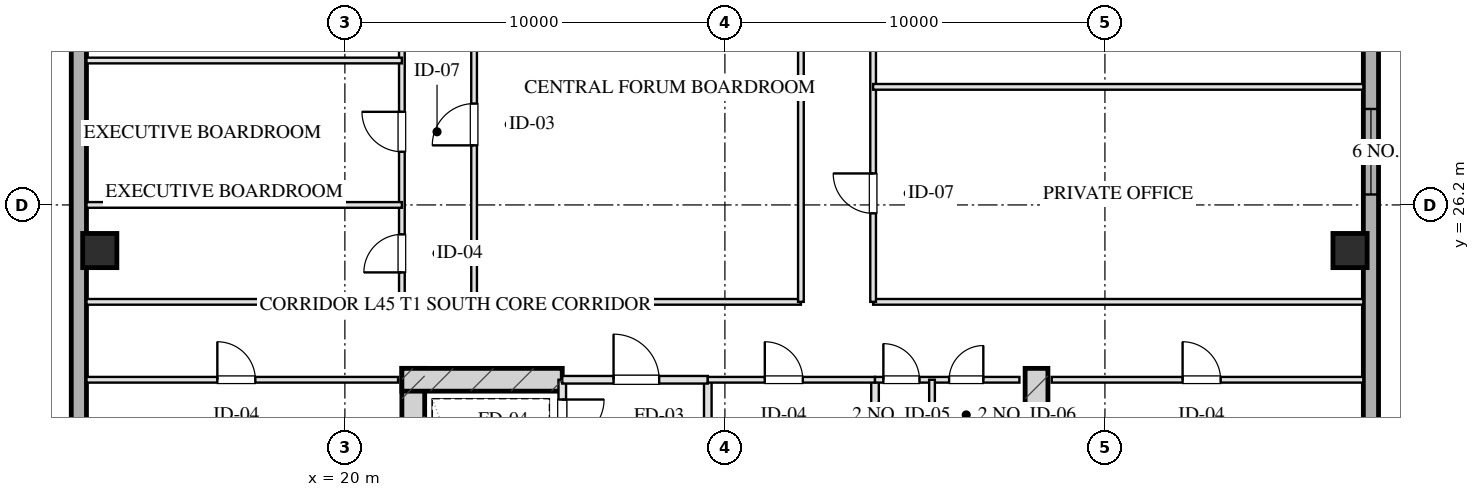
"""IFC4 building model, lengths in metres.
Left out: names, types, materials, properties, quantities, classifications, styles, units other than length and angle.
Written with IfcOpenShell. Run it as: python <this file> out.ifc"""

import sys

from ifc_helpers import new_model, si_unit, direction, frame, frame_2d, origin, origin_2d, place, context, subcontext, project, spatial, rectangle, hollow_rectangle, extrude, element, fill, save


model = new_model("IFC4")
c1 = context("Model", 3, precision=1e-05, world=origin(), true_north=direction((0.0, 1.0)))
c2 = subcontext(c1, "Body", "Model", "MODEL_VIEW")
j1 = project(units=[si_unit("LENGTHUNIT", "METRE"), si_unit("PLANEANGLEUNIT", "RADIAN")], contexts=[c1])
p1 = place(None, origin())
s1 = spatial("IfcSite", under=j1, at=p1, CompositionType="ELEMENT")
p2 = place(p1, origin())
s2 = spatial("IfcBuilding", under=s1, at=p2, CompositionType="ELEMENT")
p3 = place(p2, frame((0.0, 0.0, 170.2)))
s3 = spatial("IfcBuildingStorey", under=s2, at=p3, CompositionType="ELEMENT", Elevation=170.2)
for number, where, z_axis, x_axis in (
    (1, (21.8, 21.9, 0.0), (0.0, 0.0, 1.0), (0.0, -1.0, 0.0)),
    (2, (38.2, 21.9, 0.0), (0.0, 0.0, 1.0), (0.0, -1.0, 0.0)),
):
    element("IfcWall", number, at=place(p3, frame(where, z_axis=z_axis, x_axis=x_axis)), inside=s3, PredefinedType="SHEAR", context=c2, shape_type="SweptSolid", body=[
        extrude(rectangle(XDim=9.48, YDim=0.6, at=frame_2d((4.74, 0.0))), origin(), (0.0, 0.0, 1.0), 3.45),
    ])
p4 = place(p3, frame((21.5, 21.6, 0.0), z_axis=(0.0, 0.0, 1.0), x_axis=(1.0, 0.0, 0.0)))
e3 = element("IfcWall", 3, at=p4, inside=s3, PredefinedType="SHEAR", context=c2, shape_type="SweptSolid", body=[
    extrude(rectangle(XDim=4.22, YDim=0.6, at=frame_2d((2.11, 0.0))), origin(), (0.0, 0.0, 1.0), 3.45),
])
for number, where, z_axis, x_axis in (
    (4, (13.55, 25.0, 0.0), (0.0, 0.0, 1.0), (1.0, 0.0, 0.0)),
    (5, (46.45, 25.0, 0.0), (0.0, 0.0, 1.0), (1.0, 0.0, 0.0)),
):
    element("IfcColumn", number, at=place(p3, frame(where, z_axis=z_axis, x_axis=x_axis)), inside=s3, PredefinedType="COLUMN", context=c2, shape_type="SweptSolid", body=[
        extrude(hollow_rectangle(XDim=0.9, YDim=0.9, WallThickness=0.032, at=origin_2d()), origin(), (0.0, 0.0, 1.0), 3.451),
    ])
p5 = place(p3, frame((13.0, 10.8, 0.0), z_axis=(0.0, 0.0, 1.0), x_axis=(0.0, 1.0, 0.0)))
e6 = element("IfcWall", 6, at=p5, inside=s3, PredefinedType="SOLIDWALL", context=c2, shape_type="SweptSolid", body=[
    extrude(rectangle(XDim=46.4, YDim=0.4, at=frame_2d((23.2, 0.0))), origin(), (0.0, 0.0, 1.0), 2.61),
])
p6 = place(p3, frame((47.0, 57.2, 0.0), z_axis=(0.0, 0.0, 1.0), x_axis=(0.0, -1.0, 0.0)))
e7 = element("IfcWall", 7, at=p6, inside=s3, PredefinedType="SOLIDWALL", context=c2, shape_type="SweptSolid", body=[
    extrude(rectangle(XDim=46.4, YDim=0.4, at=frame_2d((23.2, 0.0))), origin(), (0.0, 0.0, 1.0), 2.61),
])
p7 = place(p6, frame((28.475, 0.0, 0.75)))
e8 = element("IfcOpeningElement", 8, at=p7, cuts=e7, PredefinedType="OPENING", context=c2, shape_type="SweptSolid", body=[
    extrude(rectangle(XDim=2.25, YDim=1.46, at=frame_2d((1.125, 0.73))), frame((0.0, 0.21, 0.0), z_axis=(0.0, -1.0, 0.0), x_axis=(1.0, 0.0, 0.0)), (0.0, 0.0, 1.0), 0.42),
])
p8 = place(p6, frame((24.675, 0.0, 0.75)))
e9 = element("IfcOpeningElement", 9, at=p8, cuts=e7, PredefinedType="OPENING", context=c2, shape_type="SweptSolid", body=[
    extrude(rectangle(XDim=2.25, YDim=1.46, at=frame_2d((1.125, 0.73))), frame((0.0, 0.21, 0.0), z_axis=(0.0, -1.0, 0.0), x_axis=(1.0, 0.0, 0.0)), (0.0, 0.0, 1.0), 0.42),
])
p9 = place(p3, frame((25.72, 21.6, 0.0), z_axis=(0.0, 0.0, 1.0), x_axis=(0.0, -1.0, 0.0)))
e10 = element("IfcWall", 10, at=p9, inside=s3, PredefinedType="PARTITIONING", context=c2, shape_type="SweptSolid", body=[
    extrude(rectangle(XDim=1.9, YDim=0.2, at=frame_2d((0.95, 0.0))), origin(), (0.0, 0.0, 1.0), 3.175),
])
p10 = place(p9, frame((0.52, 0.0, 0.0)))
e11 = element("IfcOpeningElement", 11, at=p10, cuts=e10, PredefinedType="OPENING", context=c2, shape_type="SweptSolid", body=[
    extrude(rectangle(XDim=1.1, YDim=2.05, at=frame_2d((0.55, 1.025))), frame((0.0, 0.11, 0.0), z_axis=(0.0, -1.0, 0.0), x_axis=(1.0, 0.0, 0.0)), (0.0, 0.0, 1.0), 0.22),
])
p11 = place(p3, frame((29.55, 21.6, 0.0), z_axis=(0.0, 0.0, 1.0), x_axis=(0.0, -1.0, 0.0)))
e12 = element("IfcWall", 12, at=p11, inside=s3, PredefinedType="PARTITIONING", context=c2, shape_type="SweptSolid", body=[
    extrude(rectangle(XDim=8.43, YDim=0.2, at=frame_2d((4.215, 0.0))), origin(), (0.0, 0.0, 1.0), 3.175),
])
p12 = place(p3, frame((25.72, 21.6, 0.0), z_axis=(0.0, 0.0, 1.0), x_axis=(1.0, 0.0, 0.0)))
e13 = element("IfcWall", 13, at=p12, inside=s3, PredefinedType="PARTITIONING", context=c2, shape_type="SweptSolid", body=[
    extrude(rectangle(XDim=3.83, YDim=0.2, at=frame_2d((1.915, 0.0))), origin(), (0.0, 0.0, 1.0), 3.175),
])
p13 = place(p12, frame((1.35, 0.0, 0.0)))
e14 = element("IfcOpeningElement", 14, at=p13, cuts=e13, PredefinedType="OPENING", context=c2, shape_type="SweptSolid", body=[
    extrude(rectangle(XDim=1.2, YDim=2.05, at=frame_2d((0.6, 1.025))), frame((0.0, 0.11, 0.0), z_axis=(0.0, -1.0, 0.0), x_axis=(1.0, 0.0, 0.0)), (0.0, 0.0, 1.0), 0.22),
])
p14 = place(p3, frame((33.95, 21.6, 0.0), z_axis=(0.0, 0.0, 1.0), x_axis=(0.0, -1.0, 0.0)))
e15 = element("IfcWall", 15, at=p14, inside=s3, PredefinedType="PARTITIONING", context=c2, shape_type="SweptSolid", body=[
    extrude(rectangle(XDim=8.43, YDim=0.2, at=frame_2d((4.215, 0.0))), origin(), (0.0, 0.0, 1.0), 3.175),
])
p15 = place(p3, frame((29.55, 21.6, 0.0), z_axis=(0.0, 0.0, 1.0), x_axis=(1.0, 0.0, 0.0)))
e16 = element("IfcWall", 16, at=p15, inside=s3, PredefinedType="PARTITIONING", context=c2, shape_type="SweptSolid", body=[
    extrude(rectangle(XDim=4.4, YDim=0.15, at=frame_2d((2.2, 0.0))), origin(), (0.0, 0.0, 1.0), 3.175),
])
p16 = place(p15, frame((1.5, 0.0, 0.0)))
e17 = element("IfcOpeningElement", 17, at=p16, cuts=e16, PredefinedType="OPENING", context=c2, shape_type="SweptSolid", body=[
    extrude(rectangle(XDim=1.0, YDim=2.05, at=frame_2d((0.5, 1.025))), frame((0.0, 0.085, 0.0), z_axis=(0.0, -1.0, 0.0), x_axis=(1.0, 0.0, 0.0)), (0.0, 0.0, 1.0), 0.17),
])
p17 = place(p3, frame((33.95, 21.6, 0.0), z_axis=(0.0, 0.0, 1.0), x_axis=(1.0, 0.0, 0.0)))
e18 = element("IfcWall", 18, at=p17, inside=s3, PredefinedType="PARTITIONING", context=c2, shape_type="SweptSolid", body=[
    extrude(rectangle(XDim=3.8, YDim=0.15, at=frame_2d((1.9, 0.0))), origin(), (0.0, 0.0, 1.0), 3.175),
])
p18 = place(p17, frame((0.22, 0.0, 0.0)))
e19 = element("IfcOpeningElement", 19, at=p18, cuts=e18, PredefinedType="OPENING", context=c2, shape_type="SweptSolid", body=[
    extrude(rectangle(XDim=0.95, YDim=2.05, at=frame_2d((0.475, 1.025))), frame((0.0, 0.085, 0.0), z_axis=(0.0, -1.0, 0.0), x_axis=(1.0, 0.0, 0.0)), (0.0, 0.0, 1.0), 0.17),
])
p19 = place(p17, frame((1.95, 0.0, 0.0)))
e20 = element("IfcOpeningElement", 20, at=p19, cuts=e18, PredefinedType="OPENING", context=c2, shape_type="SweptSolid", body=[
    extrude(rectangle(XDim=0.9, YDim=2.05, at=frame_2d((0.45, 1.025))), frame((0.0, 0.085, 0.0), z_axis=(0.0, -1.0, 0.0), x_axis=(1.0, 0.0, 0.0)), (0.0, 0.0, 1.0), 0.17),
])
p20 = place(p3, frame((35.45, 21.6, 0.0), z_axis=(0.0, 0.0, 1.0), x_axis=(0.0, -1.0, 0.0)))
e21 = element("IfcWall", 21, at=p20, inside=s3, PredefinedType="PARTITIONING", context=c2, shape_type="SweptSolid", body=[
    extrude(rectangle(XDim=8.43, YDim=0.15, at=frame_2d((4.215, 0.0))), origin(), (0.0, 0.0, 1.0), 2.815),
])
p21 = place(p20, frame((2.55, 0.0, 0.0)))
e22 = element("IfcOpeningElement", 22, at=p21, cuts=e21, PredefinedType="OPENING", context=c2, shape_type="SweptSolid", body=[
    extrude(rectangle(XDim=0.95, YDim=2.05, at=frame_2d((0.475, 1.025))), frame((0.0, 0.085, 0.0), z_axis=(0.0, -1.0, 0.0), x_axis=(1.0, 0.0, 0.0)), (0.0, 0.0, 1.0), 0.17),
])
p22 = place(p20, frame((5.6, 0.0, 0.0)))
e23 = element("IfcOpeningElement", 23, at=p22, cuts=e21, PredefinedType="OPENING", context=c2, shape_type="SweptSolid", body=[
    extrude(rectangle(XDim=0.9, YDim=2.05, at=frame_2d((0.45, 1.025))), frame((0.0, 0.085, 0.0), z_axis=(0.0, -1.0, 0.0), x_axis=(1.0, 0.0, 0.0)), (0.0, 0.0, 1.0), 0.17),
])
p23 = place(p3, frame((13.2, 21.6, 0.0), z_axis=(0.0, 0.0, 1.0), x_axis=(1.0, 0.0, 0.0)))
e24 = element("IfcWall", 24, at=p23, inside=s3, PredefinedType="PARTITIONING", context=c2, shape_type="SweptSolid", body=[
    extrude(rectangle(XDim=8.2, YDim=0.15, at=frame_2d((4.1, 0.0))), origin(), (0.0, 0.0, 1.0), 3.175),
])
p24 = place(p23, frame((3.444, 0.0, 0.0)))
e25 = element("IfcOpeningElement", 25, at=p24, cuts=e24, PredefinedType="OPENING", context=c2, shape_type="SweptSolid", body=[
    extrude(rectangle(XDim=1.0, YDim=2.05, at=frame_2d((0.5, 1.025))), frame((0.0, 0.085, 0.0), z_axis=(0.0, -1.0, 0.0), x_axis=(1.0, 0.0, 0.0)), (0.0, 0.0, 1.0), 0.17),
])
p25 = place(p3, frame((38.6, 21.6, 0.0), z_axis=(0.0, 0.0, 1.0), x_axis=(1.0, 0.0, 0.0)))
e26 = element("IfcWall", 26, at=p25, inside=s3, PredefinedType="PARTITIONING", context=c2, shape_type="SweptSolid", body=[
    extrude(rectangle(XDim=8.2, YDim=0.15, at=frame_2d((4.1, 0.0))), origin(), (0.0, 0.0, 1.0), 3.175),
])
p26 = place(p25, frame((3.444, 0.0, 0.0)))
e27 = element("IfcOpeningElement", 27, at=p26, cuts=e26, PredefinedType="OPENING", context=c2, shape_type="SweptSolid", body=[
    extrude(rectangle(XDim=1.0, YDim=2.05, at=frame_2d((0.5, 1.025))), frame((0.0, 0.085, 0.0), z_axis=(0.0, -1.0, 0.0), x_axis=(1.0, 0.0, 0.0)), (0.0, 0.0, 1.0), 0.17),
])
p27 = place(p3, frame((13.2, 23.65, 0.0), z_axis=(0.0, 0.0, 1.0), x_axis=(1.0, 0.0, 0.0)))
e28 = element("IfcWall", 28, at=p27, inside=s3, PredefinedType="PARTITIONING", context=c2, shape_type="SweptSolid", body=[
    extrude(rectangle(XDim=8.3, YDim=0.15, at=frame_2d((4.15, 0.0))), origin(), (0.0, 0.0, 1.0), 3.175),
])
p28 = place(p3, frame((23.4, 23.65, 0.0), z_axis=(0.0, 0.0, 1.0), x_axis=(1.0, 0.0, 0.0)))
e29 = element("IfcWall", 29, at=p28, inside=s3, PredefinedType="PARTITIONING", context=c2, shape_type="SweptSolid", body=[
    extrude(rectangle(XDim=8.6, YDim=0.15, at=frame_2d((4.3, 0.0))), origin(), (0.0, 0.0, 1.0), 3.175),
])
p29 = place(p3, frame((33.9, 23.65, 0.0), z_axis=(0.0, 0.0, 1.0), x_axis=(1.0, 0.0, 0.0)))
e30 = element("IfcWall", 30, at=p29, inside=s3, PredefinedType="PARTITIONING", context=c2, shape_type="SweptSolid", body=[
    extrude(rectangle(XDim=12.9, YDim=0.15, at=frame_2d((6.45, 0.0))), origin(), (0.0, 0.0, 1.0), 3.175),
])
p30 = place(p3, frame((21.5, 23.65, 0.0), z_axis=(0.0, 0.0, 1.0), x_axis=(0.0, 1.0, 0.0)))
e31 = element("IfcWall", 31, at=p30, inside=s3, PredefinedType="PARTITIONING", context=c2, shape_type="SweptSolid", body=[
    extrude(rectangle(XDim=20.7, YDim=0.15, at=frame_2d((10.35, 0.0))), origin(), (0.0, 0.0, 1.0), 3.175),
])
p31 = place(p30, frame((0.775, 0.0, 0.0)))
e32 = element("IfcOpeningElement", 32, at=p31, cuts=e31, PredefinedType="OPENING", context=c2, shape_type="SweptSolid", body=[
    extrude(rectangle(XDim=1.0, YDim=2.05, at=frame_2d((0.5, 1.025))), frame((0.0, 0.085, 0.0), z_axis=(0.0, -1.0, 0.0), x_axis=(1.0, 0.0, 0.0)), (0.0, 0.0, 1.0), 0.17),
])
p32 = place(p30, frame((3.95, 0.0, 0.0)))
e33 = element("IfcOpeningElement", 33, at=p32, cuts=e31, PredefinedType="OPENING", context=c2, shape_type="SweptSolid", body=[
    extrude(rectangle(XDim=1.05, YDim=2.05, at=frame_2d((0.525, 1.025))), frame((0.0, 0.085, 0.0), z_axis=(0.0, -1.0, 0.0), x_axis=(1.0, 0.0, 0.0)), (0.0, 0.0, 1.0), 0.17),
])
p33 = place(p30, frame((7.51, 0.0, 0.0)))
e34 = element("IfcOpeningElement", 34, at=p33, cuts=e31, PredefinedType="OPENING", context=c2, shape_type="SweptSolid", body=[
    extrude(rectangle(XDim=1.0, YDim=2.05, at=frame_2d((0.5, 1.025))), frame((0.0, 0.085, 0.0), z_axis=(0.0, -1.0, 0.0), x_axis=(1.0, 0.0, 0.0)), (0.0, 0.0, 1.0), 0.17),
])
p34 = place(p30, frame((11.51, 0.0, 0.0)))
e35 = element("IfcOpeningElement", 35, at=p34, cuts=e31, PredefinedType="OPENING", context=c2, shape_type="SweptSolid", body=[
    extrude(rectangle(XDim=1.0, YDim=2.05, at=frame_2d((0.5, 1.025))), frame((0.0, 0.085, 0.0), z_axis=(0.0, -1.0, 0.0), x_axis=(1.0, 0.0, 0.0)), (0.0, 0.0, 1.0), 0.17),
])
p35 = place(p30, frame((15.75, 0.0, 0.0)))
e36 = element("IfcOpeningElement", 36, at=p35, cuts=e31, PredefinedType="OPENING", context=c2, shape_type="SweptSolid", body=[
    extrude(rectangle(XDim=1.0, YDim=2.05, at=frame_2d((0.5, 1.025))), frame((0.0, 0.085, 0.0), z_axis=(0.0, -1.0, 0.0), x_axis=(1.0, 0.0, 0.0)), (0.0, 0.0, 1.0), 0.17),
])
p36 = place(p30, frame((18.925, 0.0, 0.0)))
e37 = element("IfcOpeningElement", 37, at=p36, cuts=e31, PredefinedType="OPENING", context=c2, shape_type="SweptSolid", body=[
    extrude(rectangle(XDim=0.85, YDim=2.05, at=frame_2d((0.425, 1.025))), frame((0.0, 0.085, 0.0), z_axis=(0.0, -1.0, 0.0), x_axis=(1.0, 0.0, 0.0)), (0.0, 0.0, 1.0), 0.17),
])
p37 = place(p3, frame((23.4, 23.65, 0.0), z_axis=(0.0, 0.0, 1.0), x_axis=(0.0, 1.0, 0.0)))
e38 = element("IfcWall", 38, at=p37, inside=s3, PredefinedType="PARTITIONING", context=c2, shape_type="SweptSolid", body=[
    extrude(rectangle(XDim=20.7, YDim=0.15, at=frame_2d((10.35, 0.0))), origin(), (0.0, 0.0, 1.0), 3.175),
])
p38 = place(p37, frame((4.117, 0.0, 0.0)))
e39 = element("IfcOpeningElement", 39, at=p38, cuts=e38, PredefinedType="OPENING", context=c2, shape_type="SweptSolid", body=[
    extrude(rectangle(XDim=1.1, YDim=2.05, at=frame_2d((0.55, 1.025))), frame((0.0, 0.085, 0.0), z_axis=(0.0, -1.0, 0.0), x_axis=(1.0, 0.0, 0.0)), (0.0, 0.0, 1.0), 0.17),
])
p39 = place(p37, frame((14.347, 0.0, 0.0)))
e40 = element("IfcOpeningElement", 40, at=p39, cuts=e38, PredefinedType="OPENING", context=c2, shape_type="SweptSolid", body=[
    extrude(rectangle(XDim=1.1, YDim=2.05, at=frame_2d((0.55, 1.025))), frame((0.0, 0.085, 0.0), z_axis=(0.0, -1.0, 0.0), x_axis=(1.0, 0.0, 0.0)), (0.0, 0.0, 1.0), 0.17),
])
p40 = place(p3, frame((32.0, 23.65, 0.0), z_axis=(0.0, 0.0, 1.0), x_axis=(0.0, 1.0, 0.0)))
e41 = element("IfcWall", 41, at=p40, inside=s3, PredefinedType="PARTITIONING", context=c2, shape_type="SweptSolid", body=[
    extrude(rectangle(XDim=20.7, YDim=0.15, at=frame_2d((10.35, 0.0))), origin(), (0.0, 0.0, 1.0), 3.175),
])
p41 = place(p3, frame((33.9, 23.65, 0.0), z_axis=(0.0, 0.0, 1.0), x_axis=(0.0, 1.0, 0.0)))
e42 = element("IfcWall", 42, at=p41, inside=s3, PredefinedType="PARTITIONING", context=c2, shape_type="SweptSolid", body=[
    extrude(rectangle(XDim=20.7, YDim=0.15, at=frame_2d((10.35, 0.0))), origin(), (0.0, 0.0, 1.0), 3.175),
])
p42 = place(p41, frame((2.329, 0.0, 0.0)))
e43 = element("IfcOpeningElement", 43, at=p42, cuts=e42, PredefinedType="OPENING", context=c2, shape_type="SweptSolid", body=[
    extrude(rectangle(XDim=1.05, YDim=2.05, at=frame_2d((0.525, 1.025))), frame((0.0, 0.085, 0.0), z_axis=(0.0, -1.0, 0.0), x_axis=(1.0, 0.0, 0.0)), (0.0, 0.0, 1.0), 0.17),
])
p43 = place(p41, frame((8.104, 0.0, 0.0)))
e44 = element("IfcOpeningElement", 44, at=p43, cuts=e42, PredefinedType="OPENING", context=c2, shape_type="SweptSolid", body=[
    extrude(rectangle(XDim=1.0, YDim=2.05, at=frame_2d((0.5, 1.025))), frame((0.0, 0.085, 0.0), z_axis=(0.0, -1.0, 0.0), x_axis=(1.0, 0.0, 0.0)), (0.0, 0.0, 1.0), 0.17),
])
p44 = place(p41, frame((14.35, 0.0, 0.0)))
e45 = element("IfcOpeningElement", 45, at=p44, cuts=e42, PredefinedType="OPENING", context=c2, shape_type="SweptSolid", body=[
    extrude(rectangle(XDim=1.0, YDim=2.05, at=frame_2d((0.5, 1.025))), frame((0.0, 0.085, 0.0), z_axis=(0.0, -1.0, 0.0), x_axis=(1.0, 0.0, 0.0)), (0.0, 0.0, 1.0), 0.17),
])
p45 = place(p41, frame((18.925, 0.0, 0.0)))
e46 = element("IfcOpeningElement", 46, at=p45, cuts=e42, PredefinedType="OPENING", context=c2, shape_type="SweptSolid", body=[
    extrude(rectangle(XDim=1.0, YDim=2.05, at=frame_2d((0.5, 1.025))), frame((0.0, 0.085, 0.0), z_axis=(0.0, -1.0, 0.0), x_axis=(1.0, 0.0, 0.0)), (0.0, 0.0, 1.0), 0.17),
])
for number, where, z_axis, x_axis in (
    (47, (13.2, 26.2, 0.0), (0.0, 0.0, 1.0), (1.0, 0.0, 0.0)),
    (48, (13.2, 30.0, 0.0), (0.0, 0.0, 1.0), (1.0, 0.0, 0.0)),
):
    element("IfcWall", number, at=place(p3, frame(where, z_axis=z_axis, x_axis=x_axis)), inside=s3, PredefinedType="PARTITIONING", context=c2, shape_type="SweptSolid", body=[
        extrude(rectangle(XDim=8.3, YDim=0.15, at=frame_2d((4.15, 0.0))), origin(), (0.0, 0.0, 1.0), 3.175),
    ])
p46 = place(p3, frame((33.9, 29.307, 0.0), z_axis=(0.0, 0.0, 1.0), x_axis=(1.0, 0.0, 0.0)))
e49 = element("IfcWall", 49, at=p46, inside=s3, PredefinedType="PARTITIONING", context=c2, shape_type="SweptSolid", body=[
    extrude(rectangle(XDim=12.9, YDim=0.15, at=frame_2d((6.45, 0.0))), origin(), (0.0, 0.0, 1.0), 3.175),
])
p47 = place(p7, origin())
e50 = element("IfcWindow", 50, at=p47, inside=s3, PartitioningType="TRIPLE_PANEL_VERTICAL", PredefinedType="WINDOW", context=c2, shape_type="SweptSolid", body=[
    extrude(rectangle(XDim=2.25, YDim=1.46, at=frame_2d((1.125, 0.73))), frame((0.0, 0.03, 0.0), z_axis=(0.0, -1.0, 0.0), x_axis=(1.0, 0.0, 0.0)), (0.0, 0.0, 1.0), 0.06),
])
fill(e8, e50)
p48 = place(p10, origin())
e51 = element("IfcDoor", 51, at=p48, inside=s3, OperationType="SINGLE_SWING_LEFT", PredefinedType="DOOR", context=c2, shape_type="SweptSolid", body=[
    extrude(rectangle(XDim=1.1, YDim=2.05, at=frame_2d((0.55, 1.025))), frame((0.0, 0.025, 0.0), z_axis=(0.0, -1.0, 0.0), x_axis=(1.0, 0.0, 0.0)), (0.0, 0.0, 1.0), 0.05),
])
fill(e11, e51)
p49 = place(p13, origin())
e52 = element("IfcDoor", 52, at=p49, inside=s3, OperationType="SINGLE_SWING_LEFT", PredefinedType="DOOR", context=c2, shape_type="SweptSolid", body=[
    extrude(rectangle(XDim=1.2, YDim=2.05, at=frame_2d((0.6, 1.025))), frame((0.0, 0.025, 0.0), z_axis=(0.0, -1.0, 0.0), x_axis=(1.0, 0.0, 0.0)), (0.0, 0.0, 1.0), 0.05),
])
fill(e14, e52)
p50 = place(p16, origin())
e53 = element("IfcDoor", 53, at=p50, inside=s3, OperationType="SINGLE_SWING_LEFT", PredefinedType="DOOR", context=c2, shape_type="SweptSolid", body=[
    extrude(rectangle(XDim=1.0, YDim=2.05, at=frame_2d((0.5, 1.025))), frame((0.0, 0.025, 0.0), z_axis=(0.0, -1.0, 0.0), x_axis=(1.0, 0.0, 0.0)), (0.0, 0.0, 1.0), 0.05),
])
fill(e17, e53)
p51 = place(p18, origin())
e54 = element("IfcDoor", 54, at=p51, inside=s3, OperationType="SINGLE_SWING_LEFT", PredefinedType="DOOR", context=c2, shape_type="SweptSolid", body=[
    extrude(rectangle(XDim=0.95, YDim=2.05, at=frame_2d((0.475, 1.025))), frame((0.0, 0.025, 0.0), z_axis=(0.0, -1.0, 0.0), x_axis=(1.0, 0.0, 0.0)), (0.0, 0.0, 1.0), 0.05),
])
fill(e19, e54)
p52 = place(p19, origin())
e55 = element("IfcDoor", 55, at=p52, inside=s3, OperationType="SINGLE_SWING_RIGHT", PredefinedType="DOOR", context=c2, shape_type="SweptSolid", body=[
    extrude(rectangle(XDim=0.9, YDim=2.05, at=frame_2d((0.45, 1.025))), frame((0.0, 0.025, 0.0), z_axis=(0.0, -1.0, 0.0), x_axis=(1.0, 0.0, 0.0)), (0.0, 0.0, 1.0), 0.05),
])
fill(e20, e55)
p53 = place(p24, origin())
e56 = element("IfcDoor", 56, at=p53, inside=s3, OperationType="SINGLE_SWING_LEFT", PredefinedType="DOOR", context=c2, shape_type="SweptSolid", body=[
    extrude(rectangle(XDim=1.0, YDim=2.05, at=frame_2d((0.5, 1.025))), frame((0.0, 0.025, 0.0), z_axis=(0.0, -1.0, 0.0), x_axis=(1.0, 0.0, 0.0)), (0.0, 0.0, 1.0), 0.05),
])
fill(e25, e56)
p54 = place(p26, origin())
e57 = element("IfcDoor", 57, at=p54, inside=s3, OperationType="SINGLE_SWING_LEFT", PredefinedType="DOOR", context=c2, shape_type="SweptSolid", body=[
    extrude(rectangle(XDim=1.0, YDim=2.05, at=frame_2d((0.5, 1.025))), frame((0.0, 0.025, 0.0), z_axis=(0.0, -1.0, 0.0), x_axis=(1.0, 0.0, 0.0)), (0.0, 0.0, 1.0), 0.05),
])
fill(e27, e57)
p55 = place(p31, origin())
e58 = element("IfcDoor", 58, at=p55, inside=s3, OperationType="SINGLE_SWING_LEFT", PredefinedType="DOOR", context=c2, shape_type="SweptSolid", body=[
    extrude(rectangle(XDim=1.0, YDim=2.05, at=frame_2d((0.5, 1.025))), frame((0.0, 0.025, 0.0), z_axis=(0.0, -1.0, 0.0), x_axis=(1.0, 0.0, 0.0)), (0.0, 0.0, 1.0), 0.05),
])
fill(e32, e58)
p56 = place(p32, origin())
e59 = element("IfcDoor", 59, at=p56, inside=s3, OperationType="SINGLE_SWING_RIGHT", PredefinedType="DOOR", context=c2, shape_type="SweptSolid", body=[
    extrude(rectangle(XDim=1.05, YDim=2.05, at=frame_2d((0.525, 1.025))), frame((0.0, 0.025, 0.0), z_axis=(0.0, -1.0, 0.0), x_axis=(1.0, 0.0, 0.0)), (0.0, 0.0, 1.0), 0.05),
])
fill(e33, e59)
p57 = place(p38, origin())
e60 = element("IfcDoor", 60, at=p57, inside=s3, OperationType="SINGLE_SWING_LEFT", PredefinedType="DOOR", context=c2, shape_type="SweptSolid", body=[
    extrude(rectangle(XDim=1.1, YDim=2.05, at=frame_2d((0.55, 1.025))), frame((0.0, 0.025, 0.0), z_axis=(0.0, -1.0, 0.0), x_axis=(1.0, 0.0, 0.0)), (0.0, 0.0, 1.0), 0.05),
])
fill(e39, e60)
p58 = place(p42, origin())
e61 = element("IfcDoor", 61, at=p58, inside=s3, OperationType="SINGLE_SWING_RIGHT", PredefinedType="DOOR", context=c2, shape_type="SweptSolid", body=[
    extrude(rectangle(XDim=1.05, YDim=2.05, at=frame_2d((0.525, 1.025))), frame((0.0, 0.025, 0.0), z_axis=(0.0, -1.0, 0.0), x_axis=(1.0, 0.0, 0.0)), (0.0, 0.0, 1.0), 0.05),
])
fill(e43, e61)
save(model, sys.argv[1])
